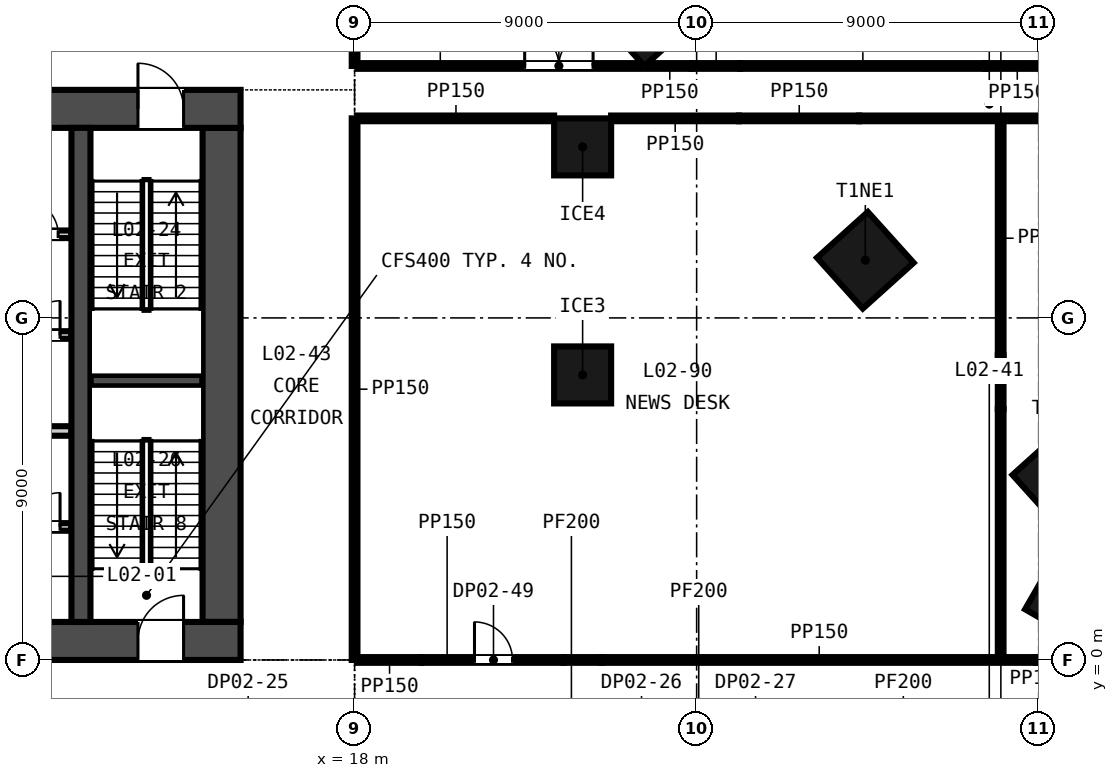
"""IFC4 building model, lengths in metres.
Left out: names, types, materials, properties, quantities, classifications, styles, units other than length and angle.
Written with IfcOpenShell. Run it as: python <this file> out.ifc"""

import sys

from ifc_helpers import new_model, si_unit, direction, frame, frame_2d, origin, origin_2d, place, context, subcontext, project, spatial, rectangle, extrude, element, fill, save


model = new_model("IFC4")
c1 = context("Model", 3, precision=1e-05, world=origin(), true_north=direction((0.0, 1.0)))
c2 = subcontext(c1, "Body", "Model", "MODEL_VIEW")
j1 = project(units=[si_unit("LENGTHUNIT", "METRE"), si_unit("PLANEANGLEUNIT", "RADIAN")], contexts=[c1])
p1 = place(None, origin())
s1 = spatial("IfcSite", under=j1, at=p1, CompositionType="ELEMENT")
p2 = place(p1, origin())
s2 = spatial("IfcBuilding", under=s1, at=p2, CompositionType="ELEMENT")
p3 = place(p2, frame((0.0, 0.0, 18.0)))
s3 = spatial("IfcBuildingStorey", under=s2, at=p3, CompositionType="ELEMENT", Elevation=18.0)
p4 = place(p3, frame((-15.0, 0.5, -0.4), z_axis=(0.0, 0.0, 1.0), x_axis=(1.0, 0.0, 0.0)))
e1 = element("IfcWall", 1, at=p4, inside=s3, PredefinedType="SOLIDWALL", context=c2, shape_type="SweptSolid", body=[
    extrude(rectangle(XDim=30.0, YDim=1.0, at=frame_2d((15.0, 0.0))), origin(), (0.0, 0.0, 1.0), 4.6),
])
p5 = place(p4, frame((5.8, 0.0, 0.4)))
e2 = element("IfcOpeningElement", 2, at=p5, cuts=e1, PredefinedType="OPENING", context=c2, shape_type="SweptSolid", body=[
    extrude(rectangle(XDim=2.4, YDim=2.4, at=frame_2d((1.2, 1.2))), frame((0.0, 0.51, 0.0), z_axis=(0.0, -1.0, 0.0), x_axis=(1.0, 0.0, 0.0)), (0.0, 0.0, 1.0), 1.02),
])
p6 = place(p4, frame((13.8, 0.0, 0.4)))
e3 = element("IfcOpeningElement", 3, at=p6, cuts=e1, PredefinedType="OPENING", context=c2, shape_type="SweptSolid", body=[
    extrude(rectangle(XDim=2.4, YDim=2.4, at=frame_2d((1.2, 1.2))), frame((0.0, 0.51, 0.0), z_axis=(0.0, -1.0, 0.0), x_axis=(1.0, 0.0, 0.0)), (0.0, 0.0, 1.0), 1.02),
])
p7 = place(p4, frame((21.8, 0.0, 0.4)))
e4 = element("IfcOpeningElement", 4, at=p7, cuts=e1, PredefinedType="OPENING", context=c2, shape_type="SweptSolid", body=[
    extrude(rectangle(XDim=2.4, YDim=2.4, at=frame_2d((1.2, 1.2))), frame((0.0, 0.51, 0.0), z_axis=(0.0, -1.0, 0.0), x_axis=(1.0, 0.0, 0.0)), (0.0, 0.0, 1.0), 1.02),
])
p8 = place(p4, frame((1.5, 0.0, 0.4)))
e5 = element("IfcOpeningElement", 5, at=p8, cuts=e1, PredefinedType="OPENING", context=c2, shape_type="SweptSolid", body=[
    extrude(rectangle(XDim=1.2, YDim=2.1, at=frame_2d((0.6, 1.05))), frame((0.0, 0.51, 0.0), z_axis=(0.0, -1.0, 0.0), x_axis=(1.0, 0.0, 0.0)), (0.0, 0.0, 1.0), 1.02),
])
p9 = place(p4, frame((27.3, 0.0, 0.4)))
e6 = element("IfcOpeningElement", 6, at=p9, cuts=e1, PredefinedType="OPENING", context=c2, shape_type="SweptSolid", body=[
    extrude(rectangle(XDim=1.2, YDim=2.1, at=frame_2d((0.6, 1.05))), frame((0.0, 0.51, 0.0), z_axis=(0.0, -1.0, 0.0), x_axis=(1.0, 0.0, 0.0)), (0.0, 0.0, 1.0), 1.02),
])
p10 = place(p3, frame((-15.0, 14.5, -0.4), z_axis=(0.0, 0.0, 1.0), x_axis=(1.0, 0.0, 0.0)))
e7 = element("IfcWall", 7, at=p10, inside=s3, PredefinedType="SOLIDWALL", context=c2, shape_type="SweptSolid", body=[
    extrude(rectangle(XDim=30.0, YDim=1.0, at=frame_2d((15.0, 0.0))), origin(), (0.0, 0.0, 1.0), 4.6),
])
p11 = place(p10, frame((9.25, 0.0, 0.4)))
e8 = element("IfcOpeningElement", 8, at=p11, cuts=e7, PredefinedType="OPENING", context=c2, shape_type="SweptSolid", body=[
    extrude(rectangle(XDim=1.5, YDim=2.1, at=frame_2d((0.75, 1.05))), frame((0.0, 0.51, 0.0), z_axis=(0.0, -1.0, 0.0), x_axis=(1.0, 0.0, 0.0)), (0.0, 0.0, 1.0), 1.02),
])
p12 = place(p10, frame((19.4, 0.0, 0.4)))
e9 = element("IfcOpeningElement", 9, at=p12, cuts=e7, PredefinedType="OPENING", context=c2, shape_type="SweptSolid", body=[
    extrude(rectangle(XDim=1.5, YDim=2.1, at=frame_2d((0.75, 1.05))), frame((0.0, 0.51, 0.0), z_axis=(0.0, -1.0, 0.0), x_axis=(1.0, 0.0, 0.0)), (0.0, 0.0, 1.0), 1.02),
])
p13 = place(p10, frame((1.5, 0.0, 0.4)))
e10 = element("IfcOpeningElement", 10, at=p13, cuts=e7, PredefinedType="OPENING", context=c2, shape_type="SweptSolid", body=[
    extrude(rectangle(XDim=1.2, YDim=2.1, at=frame_2d((0.6, 1.05))), frame((0.0, 0.51, 0.0), z_axis=(0.0, -1.0, 0.0), x_axis=(1.0, 0.0, 0.0)), (0.0, 0.0, 1.0), 1.02),
])
p14 = place(p10, frame((27.3, 0.0, 0.4)))
e11 = element("IfcOpeningElement", 11, at=p14, cuts=e7, PredefinedType="OPENING", context=c2, shape_type="SweptSolid", body=[
    extrude(rectangle(XDim=1.2, YDim=2.1, at=frame_2d((0.6, 1.05))), frame((0.0, 0.51, 0.0), z_axis=(0.0, -1.0, 0.0), x_axis=(1.0, 0.0, 0.0)), (0.0, 0.0, 1.0), 1.02),
])
p15 = place(p3, frame((14.5, 1.0, -0.4), z_axis=(0.0, 0.0, 1.0), x_axis=(0.0, 1.0, 0.0)))
e12 = element("IfcWall", 12, at=p15, inside=s3, PredefinedType="SOLIDWALL", context=c2, shape_type="SweptSolid", body=[
    extrude(rectangle(XDim=13.0, YDim=1.0, at=frame_2d((6.5, 0.0))), origin(), (0.0, 0.0, 1.0), 4.6),
])
p16 = place(p3, frame((10.8, 1.0, -0.4), z_axis=(0.0, 0.0, 1.0), x_axis=(0.0, 1.0, 0.0)))
e13 = element("IfcWall", 13, at=p16, inside=s3, PredefinedType="SOLIDWALL", context=c2, shape_type="SweptSolid", body=[
    extrude(rectangle(XDim=13.0, YDim=0.5, at=frame_2d((6.5, 0.0))), origin(), (0.0, 0.0, 1.0), 4.6),
])
for number, where, z_axis, x_axis in (
    (14, (36.872, 1.663, -0.4), (0.0, 0.0, 1.0), (0.5, 0.866, 0.0)),
    (15, (36.584, 4.803, -0.4), (0.0, 0.0, 1.0), (-0.669, 0.743, 0.0)),
    (16, (31.438, 10.517, -0.4), (0.0, 0.0, 1.0), (-0.669, 0.743, 0.0)),
    (17, (25.691, 16.9, -0.4), (0.0, 0.0, 1.0), (-0.669, 0.743, 0.0)),
):
    element("IfcColumn", number, at=place(p3, frame(where, z_axis=z_axis, x_axis=x_axis)), inside=s3, PredefinedType="COLUMN", context=c2, shape_type="SweptSolid", body=[
        extrude(rectangle(XDim=1.8, YDim=1.8, at=origin_2d()), origin(), (0.0, 0.0, 1.0), 4.6),
    ])
for number, where, z_axis, x_axis in (
    (18, (24.0, 7.5, -0.4), (0.0, 0.0, 1.0), (1.0, 0.0, 0.0)),
    (19, (24.0, 13.5, -0.4), (0.0, 0.0, 1.0), (1.0, 0.0, 0.0)),
):
    element("IfcColumn", number, at=place(p3, frame(where, z_axis=z_axis, x_axis=x_axis)), inside=s3, PredefinedType="COLUMN", context=c2, shape_type="SweptSolid", body=[
        extrude(rectangle(XDim=1.5, YDim=1.5, at=origin_2d()), origin(), (0.0, 0.0, 1.0), 4.6),
    ])
p17 = place(p3, frame((-10.55, 3.5, 0.0), z_axis=(0.0, 0.0, 1.0), x_axis=(1.0, 0.0, 0.0)))
e20 = element("IfcWall", 20, at=p17, inside=s3, PredefinedType="PARTITIONING", context=c2, shape_type="SweptSolid", body=[
    extrude(rectangle(XDim=21.1, YDim=0.2, at=frame_2d((10.55, 0.0))), origin(), (0.0, 0.0, 1.0), 4.2),
])
p18 = place(p17, frame((0.675, 0.0, 0.0)))
e21 = element("IfcOpeningElement", 21, at=p18, cuts=e20, PredefinedType="OPENING", context=c2, shape_type="SweptSolid", body=[
    extrude(rectangle(XDim=1.2, YDim=2.1, at=frame_2d((0.6, 1.05))), frame((0.0, 0.11, 0.0), z_axis=(0.0, -1.0, 0.0), x_axis=(1.0, 0.0, 0.0)), (0.0, 0.0, 1.0), 0.22),
])
p19 = place(p17, frame((3.475, 0.0, 0.0)))
e22 = element("IfcOpeningElement", 22, at=p19, cuts=e20, PredefinedType="OPENING", context=c2, shape_type="SweptSolid", body=[
    extrude(rectangle(XDim=1.2, YDim=2.1, at=frame_2d((0.6, 1.05))), frame((0.0, 0.11, 0.0), z_axis=(0.0, -1.0, 0.0), x_axis=(1.0, 0.0, 0.0)), (0.0, 0.0, 1.0), 0.22),
])
p20 = place(p17, frame((6.275, 0.0, 0.0)))
e23 = element("IfcOpeningElement", 23, at=p20, cuts=e20, PredefinedType="OPENING", context=c2, shape_type="SweptSolid", body=[
    extrude(rectangle(XDim=1.2, YDim=2.1, at=frame_2d((0.6, 1.05))), frame((0.0, 0.11, 0.0), z_axis=(0.0, -1.0, 0.0), x_axis=(1.0, 0.0, 0.0)), (0.0, 0.0, 1.0), 0.22),
])
p21 = place(p17, frame((9.075, 0.0, 0.0)))
e24 = element("IfcOpeningElement", 24, at=p21, cuts=e20, PredefinedType="OPENING", context=c2, shape_type="SweptSolid", body=[
    extrude(rectangle(XDim=1.2, YDim=2.1, at=frame_2d((0.6, 1.05))), frame((0.0, 0.11, 0.0), z_axis=(0.0, -1.0, 0.0), x_axis=(1.0, 0.0, 0.0)), (0.0, 0.0, 1.0), 0.22),
])
p22 = place(p17, frame((11.875, 0.0, 0.0)))
e25 = element("IfcOpeningElement", 25, at=p22, cuts=e20, PredefinedType="OPENING", context=c2, shape_type="SweptSolid", body=[
    extrude(rectangle(XDim=1.2, YDim=2.1, at=frame_2d((0.6, 1.05))), frame((0.0, 0.11, 0.0), z_axis=(0.0, -1.0, 0.0), x_axis=(1.0, 0.0, 0.0)), (0.0, 0.0, 1.0), 0.22),
])
p23 = place(p17, frame((14.675, 0.0, 0.0)))
e26 = element("IfcOpeningElement", 26, at=p23, cuts=e20, PredefinedType="OPENING", context=c2, shape_type="SweptSolid", body=[
    extrude(rectangle(XDim=1.2, YDim=2.1, at=frame_2d((0.6, 1.05))), frame((0.0, 0.11, 0.0), z_axis=(0.0, -1.0, 0.0), x_axis=(1.0, 0.0, 0.0)), (0.0, 0.0, 1.0), 0.22),
])
p24 = place(p17, frame((17.475, 0.0, 0.0)))
e27 = element("IfcOpeningElement", 27, at=p24, cuts=e20, PredefinedType="OPENING", context=c2, shape_type="SweptSolid", body=[
    extrude(rectangle(XDim=1.2, YDim=2.1, at=frame_2d((0.6, 1.05))), frame((0.0, 0.11, 0.0), z_axis=(0.0, -1.0, 0.0), x_axis=(1.0, 0.0, 0.0)), (0.0, 0.0, 1.0), 0.22),
])
p25 = place(p17, frame((19.9, 0.0, 0.0)))
e28 = element("IfcOpeningElement", 28, at=p25, cuts=e20, PredefinedType="OPENING", context=c2, shape_type="SweptSolid", body=[
    extrude(rectangle(XDim=0.9, YDim=2.1, at=frame_2d((0.45, 1.05))), frame((0.0, 0.11, 0.0), z_axis=(0.0, -1.0, 0.0), x_axis=(1.0, 0.0, 0.0)), (0.0, 0.0, 1.0), 0.22),
])
p26 = place(p3, frame((-10.55, 6.025, 0.0), z_axis=(0.0, 0.0, 1.0), x_axis=(1.0, 0.0, 0.0)))
e29 = element("IfcWall", 29, at=p26, inside=s3, PredefinedType="PARTITIONING", context=c2, shape_type="SweptSolid", body=[
    extrude(rectangle(XDim=21.1, YDim=0.25, at=frame_2d((10.55, 0.0))), origin(), (0.0, 0.0, 1.0), 4.2),
])
p27 = place(p3, frame((-4.125, 8.55, 0.0), z_axis=(0.0, 0.0, 1.0), x_axis=(1.0, 0.0, 0.0)))
e30 = element("IfcWall", 30, at=p27, inside=s3, PredefinedType="PARTITIONING", context=c2, shape_type="SweptSolid", body=[
    extrude(rectangle(XDim=14.675, YDim=0.2, at=frame_2d((7.337, 0.0))), origin(), (0.0, 0.0, 1.0), 4.2),
])
p28 = place(p27, frame((1.413, 0.0, 0.0)))
e31 = element("IfcOpeningElement", 31, at=p28, cuts=e30, PredefinedType="OPENING", context=c2, shape_type="SweptSolid", body=[
    extrude(rectangle(XDim=1.0, YDim=2.1, at=frame_2d((0.5, 1.05))), frame((0.0, 0.11, 0.0), z_axis=(0.0, -1.0, 0.0), x_axis=(1.0, 0.0, 0.0)), (0.0, 0.0, 1.0), 0.22),
])
p29 = place(p27, frame((5.0, 0.0, 0.0)))
e32 = element("IfcOpeningElement", 32, at=p29, cuts=e30, PredefinedType="OPENING", context=c2, shape_type="SweptSolid", body=[
    extrude(rectangle(XDim=1.0, YDim=2.1, at=frame_2d((0.5, 1.05))), frame((0.0, 0.11, 0.0), z_axis=(0.0, -1.0, 0.0), x_axis=(1.0, 0.0, 0.0)), (0.0, 0.0, 1.0), 0.22),
])
p30 = place(p27, frame((9.613, 0.0, 0.0)))
e33 = element("IfcOpeningElement", 33, at=p30, cuts=e30, PredefinedType="OPENING", context=c2, shape_type="SweptSolid", body=[
    extrude(rectangle(XDim=1.0, YDim=2.1, at=frame_2d((0.5, 1.05))), frame((0.0, 0.11, 0.0), z_axis=(0.0, -1.0, 0.0), x_axis=(1.0, 0.0, 0.0)), (0.0, 0.0, 1.0), 0.22),
])
p31 = place(p27, frame((13.475, 0.0, 0.0)))
e34 = element("IfcOpeningElement", 34, at=p31, cuts=e30, PredefinedType="OPENING", context=c2, shape_type="SweptSolid", body=[
    extrude(rectangle(XDim=0.9, YDim=2.1, at=frame_2d((0.45, 1.05))), frame((0.0, 0.11, 0.0), z_axis=(0.0, -1.0, 0.0), x_axis=(1.0, 0.0, 0.0)), (0.0, 0.0, 1.0), 0.22),
])
p32 = place(p3, frame((5.9, 11.2, 0.0), z_axis=(0.0, 0.0, 1.0), x_axis=(1.0, 0.0, 0.0)))
e35 = element("IfcWall", 35, at=p32, inside=s3, PredefinedType="PARTITIONING", context=c2, shape_type="SweptSolid", body=[
    extrude(rectangle(XDim=4.65, YDim=0.2, at=frame_2d((2.325, 0.0))), origin(), (0.0, 0.0, 1.0), 4.2),
])
p33 = place(p32, frame((3.4, 0.0, 0.0)))
e36 = element("IfcOpeningElement", 36, at=p33, cuts=e35, PredefinedType="OPENING", context=c2, shape_type="SweptSolid", body=[
    extrude(rectangle(XDim=0.9, YDim=2.1, at=frame_2d((0.45, 1.05))), frame((0.0, 0.11, 0.0), z_axis=(0.0, -1.0, 0.0), x_axis=(1.0, 0.0, 0.0)), (0.0, 0.0, 1.0), 0.22),
])
p34 = place(p3, frame((11.05, 7.35, -0.4), z_axis=(0.0, 0.0, 1.0), x_axis=(1.0, 0.0, 0.0)))
e37 = element("IfcWall", 37, at=p34, inside=s3, PredefinedType="SOLIDWALL", context=c2, shape_type="SweptSolid", body=[
    extrude(rectangle(XDim=2.95, YDim=0.3, at=frame_2d((1.475, 0.0))), origin(), (0.0, 0.0, 1.0), 4.6),
])
p35 = place(p3, frame((18.075, 0.0, 0.0), z_axis=(0.0, 0.0, 1.0), x_axis=(1.0, 0.0, 0.0)))
e38 = element("IfcWall", 38, at=p35, inside=s3, PredefinedType="PARTITIONING", context=c2, shape_type="SweptSolid", body=[
    extrude(rectangle(XDim=1.68, YDim=0.15, at=frame_2d((0.84, 0.0))), origin(), (0.0, 0.0, 1.0), 3.597),
])
p36 = place(p3, frame((19.755, 0.0, 0.0), z_axis=(0.0, 0.0, 1.0), x_axis=(1.0, 0.0, 0.0)))
e39 = element("IfcWall", 39, at=p36, inside=s3, PredefinedType="PARTITIONING", context=c2, shape_type="SweptSolid", body=[
    extrude(rectangle(XDim=3.745, YDim=0.15, at=frame_2d((1.873, 0.0))), origin(), (0.0, 0.0, 1.0), 4.2),
])
p37 = place(p36, frame((1.4, 0.0, 0.0)))
e40 = element("IfcOpeningElement", 40, at=p37, cuts=e39, PredefinedType="OPENING", context=c2, shape_type="SweptSolid", body=[
    extrude(rectangle(XDim=1.0, YDim=2.1, at=frame_2d((0.5, 1.05))), frame((0.0, 0.085, 0.0), z_axis=(0.0, -1.0, 0.0), x_axis=(1.0, 0.0, 0.0)), (0.0, 0.0, 1.0), 0.17),
])
p38 = place(p3, frame((23.5, 0.0, 0.0), z_axis=(0.0, 0.0, 1.0), x_axis=(1.0, 0.0, 0.0)))
e41 = element("IfcWall", 41, at=p38, inside=s3, PredefinedType="PARTITIONING", context=c2, shape_type="SweptSolid", body=[
    extrude(rectangle(XDim=1.0, YDim=0.15, at=frame_2d((0.5, 0.0))), origin(), (0.0, 0.0, 1.0), 3.111),
])
p39 = place(p3, frame((24.5, 0.0, 0.0), z_axis=(0.0, 0.0, 1.0), x_axis=(1.0, 0.0, 0.0)))
e42 = element("IfcWall", 42, at=p39, inside=s3, PredefinedType="PARTITIONING", context=c2, shape_type="SweptSolid", body=[
    extrude(rectangle(XDim=11.44, YDim=0.15, at=frame_2d((5.72, 0.0))), origin(), (0.0, 0.0, 1.0), 4.2),
])
p40 = place(p3, frame((35.94, 0.0, 0.0), z_axis=(0.0, 0.0, 1.0), x_axis=(1.0, 0.0, 0.0)))
e43 = element("IfcWall", 43, at=p40, inside=s3, PredefinedType="PARTITIONING", context=c2, shape_type="SweptSolid", body=[
    extrude(rectangle(XDim=1.097, YDim=0.15, at=frame_2d((0.548, 0.0))), origin(), (0.0, 0.0, 1.0), 3.2),
])
p41 = place(p3, frame((18.075, 14.25, 0.0), z_axis=(0.0, 0.0, 1.0), x_axis=(1.0, 0.0, 0.0)))
e44 = element("IfcWall", 44, at=p41, inside=s3, PredefinedType="PARTITIONING", context=c2, shape_type="SweptSolid", body=[
    extrude(rectangle(XDim=5.175, YDim=0.15, at=frame_2d((2.587, 0.0))), origin(), (0.0, 0.0, 1.0), 4.2),
])
p42 = place(p3, frame((24.75, 14.25, 0.0), z_axis=(0.0, 0.0, 1.0), x_axis=(1.0, 0.0, 0.0)))
e45 = element("IfcWall", 45, at=p42, inside=s3, PredefinedType="PARTITIONING", context=c2, shape_type="SweptSolid", body=[
    extrude(rectangle(XDim=3.361, YDim=0.15, at=frame_2d((1.681, 0.0))), origin(), (0.0, 0.0, 1.0), 4.2),
])
p43 = place(p3, frame((28.111, 14.25, 0.0), z_axis=(0.0, 0.0, 1.0), x_axis=(1.0, 0.0, 0.0)))
e46 = element("IfcWall", 46, at=p43, inside=s3, PredefinedType="PARTITIONING", context=c2, shape_type="SweptSolid", body=[
    extrude(rectangle(XDim=3.167, YDim=0.15, at=frame_2d((1.583, 0.0))), origin(), (0.0, 0.0, 1.0), 3.2),
])
p44 = place(p3, frame((31.278, 14.25, 0.0), z_axis=(0.0, 0.0, 1.0), x_axis=(1.0, 0.0, 0.0)))
e47 = element("IfcWall", 47, at=p44, inside=s3, PredefinedType="PARTITIONING", context=c2, shape_type="SweptSolid", body=[
    extrude(rectangle(XDim=20.122, YDim=0.15, at=frame_2d((10.061, 0.0))), origin(), (0.0, 0.0, 1.0), 4.2),
])
p45 = place(p3, frame((18.075, 15.629, 0.0), z_axis=(0.0, 0.0, 1.0), x_axis=(1.0, 0.0, 0.0)))
e48 = element("IfcWall", 48, at=p45, inside=s3, PredefinedType="PARTITIONING", context=c2, shape_type="SweptSolid", body=[
    extrude(rectangle(XDim=7.482, YDim=0.15, at=frame_2d((3.741, 0.0))), origin(), (0.0, 0.0, 1.0), 4.2),
])
p46 = place(p45, frame((4.4, 0.0, 0.0)))
e49 = element("IfcOpeningElement", 49, at=p46, cuts=e48, PredefinedType="OPENING", context=c2, shape_type="SweptSolid", body=[
    extrude(rectangle(XDim=1.8, YDim=2.4, at=frame_2d((0.9, 1.2))), frame((0.0, 0.085, 0.0), z_axis=(0.0, -1.0, 0.0), x_axis=(1.0, 0.0, 0.0)), (0.0, 0.0, 1.0), 0.17),
])
p47 = place(p3, frame((25.708, 15.629, 0.0), z_axis=(0.0, 0.0, 1.0), x_axis=(1.0, 0.0, 0.0)))
e50 = element("IfcWall", 50, at=p47, inside=s3, PredefinedType="PARTITIONING", context=c2, shape_type="SweptSolid", body=[
    extrude(rectangle(XDim=1.162, YDim=0.15, at=frame_2d((0.581, 0.0))), origin(), (0.0, 0.0, 1.0), 4.2),
])
p48 = place(p3, frame((26.869, 15.629, 0.0), z_axis=(0.0, 0.0, 1.0), x_axis=(1.0, 0.0, 0.0)))
e51 = element("IfcWall", 51, at=p48, inside=s3, PredefinedType="PARTITIONING", context=c2, shape_type="SweptSolid", body=[
    extrude(rectangle(XDim=1.278, YDim=0.15, at=frame_2d((0.639, 0.0))), origin(), (0.0, 0.0, 1.0), 3.2),
])
p49 = place(p3, frame((28.148, 15.629, 0.0), z_axis=(0.0, 0.0, 1.0), x_axis=(1.0, 0.0, 0.0)))
e52 = element("IfcWall", 52, at=p49, inside=s3, PredefinedType="PARTITIONING", context=c2, shape_type="SweptSolid", body=[
    extrude(rectangle(XDim=6.441, YDim=0.15, at=frame_2d((3.221, 0.0))), origin(), (0.0, 0.0, 1.0), 4.2),
])
p50 = place(p3, frame((34.589, 15.629, 0.0), z_axis=(0.0, 0.0, 1.0), x_axis=(1.0, 0.0, 0.0)))
e53 = element("IfcWall", 53, at=p50, inside=s3, PredefinedType="PARTITIONING", context=c2, shape_type="SweptSolid", body=[
    extrude(rectangle(XDim=1.685, YDim=0.15, at=frame_2d((0.843, 0.0))), origin(), (0.0, 0.0, 1.0), 3.219),
])
p51 = place(p3, frame((18.0, 0.0, 0.0), z_axis=(0.0, 0.0, 1.0), x_axis=(0.0, 1.0, 0.0)))
e54 = element("IfcWall", 54, at=p51, inside=s3, PredefinedType="PARTITIONING", context=c2, shape_type="SweptSolid", body=[
    extrude(rectangle(XDim=14.25, YDim=0.15, at=frame_2d((7.125, 0.0))), origin(), (0.0, 0.0, 1.0), 4.2),
])
p52 = place(p3, frame((18.0, 15.629, 0.0), z_axis=(0.0, 0.0, 1.0), x_axis=(0.0, 1.0, 0.0)))
e55 = element("IfcWall", 55, at=p52, inside=s3, PredefinedType="PARTITIONING", context=c2, shape_type="SweptSolid", body=[
    extrude(rectangle(XDim=9.85, YDim=0.15, at=frame_2d((4.925, 0.0))), origin(), (0.0, 0.0, 1.0), 4.2),
])
p53 = place(p3, frame((35.0, 0.075, 0.0), z_axis=(0.0, 0.0, 1.0), x_axis=(0.0, 1.0, 0.0)))
e56 = element("IfcWall", 56, at=p53, inside=s3, PredefinedType="PARTITIONING", context=c2, shape_type="SweptSolid", body=[
    extrude(rectangle(XDim=6.524, YDim=0.15, at=frame_2d((3.262, 0.0))), origin(), (0.0, 0.0, 1.0), 4.2),
])
p54 = place(p3, frame((35.0, 6.599, 0.0), z_axis=(0.0, 0.0, 1.0), x_axis=(0.0, 1.0, 0.0)))
e57 = element("IfcWall", 57, at=p54, inside=s3, PredefinedType="PARTITIONING", context=c2, shape_type="SweptSolid", body=[
    extrude(rectangle(XDim=1.42, YDim=0.15, at=frame_2d((0.71, 0.0))), origin(), (0.0, 0.0, 1.0), 3.2),
])
p55 = place(p3, frame((35.0, 8.019, 0.0), z_axis=(0.0, 0.0, 1.0), x_axis=(0.0, 1.0, 0.0)))
e58 = element("IfcWall", 58, at=p55, inside=s3, PredefinedType="PARTITIONING", context=c2, shape_type="SweptSolid", body=[
    extrude(rectangle(XDim=6.156, YDim=0.15, at=frame_2d((3.078, 0.0))), origin(), (0.0, 0.0, 1.0), 4.2),
])
p56 = place(p25, origin())
e59 = element("IfcDoor", 59, at=p56, inside=s3, OperationType="SINGLE_SWING_RIGHT", PredefinedType="DOOR", context=c2, shape_type="SweptSolid", body=[
    extrude(rectangle(XDim=0.9, YDim=2.1, at=frame_2d((0.45, 1.05))), frame((0.0, 0.025, 0.0), z_axis=(0.0, -1.0, 0.0), x_axis=(1.0, 0.0, 0.0)), (0.0, 0.0, 1.0), 0.05),
])
fill(e28, e59)
p57 = place(p31, origin())
e60 = element("IfcDoor", 60, at=p57, inside=s3, OperationType="SINGLE_SWING_RIGHT", PredefinedType="DOOR", context=c2, shape_type="SweptSolid", body=[
    extrude(rectangle(XDim=0.9, YDim=2.1, at=frame_2d((0.45, 1.05))), frame((0.0, 0.025, 0.0), z_axis=(0.0, -1.0, 0.0), x_axis=(1.0, 0.0, 0.0)), (0.0, 0.0, 1.0), 0.05),
])
fill(e34, e60)
p58 = place(p33, origin())
e61 = element("IfcDoor", 61, at=p58, inside=s3, OperationType="SINGLE_SWING_LEFT", PredefinedType="DOOR", context=c2, shape_type="SweptSolid", body=[
    extrude(rectangle(XDim=0.9, YDim=2.1, at=frame_2d((0.45, 1.05))), frame((0.0, 0.025, 0.0), z_axis=(0.0, -1.0, 0.0), x_axis=(1.0, 0.0, 0.0)), (0.0, 0.0, 1.0), 0.05),
])
fill(e36, e61)
p59 = place(p14, origin())
e62 = element("IfcDoor", 62, at=p59, inside=s3, OperationType="SINGLE_SWING_LEFT", PredefinedType="DOOR", context=c2, shape_type="SweptSolid", body=[
    extrude(rectangle(XDim=1.2, YDim=2.1, at=frame_2d((0.6, 1.05))), frame((0.0, 0.025, 0.0), z_axis=(0.0, -1.0, 0.0), x_axis=(1.0, 0.0, 0.0)), (0.0, 0.0, 1.0), 0.05),
])
fill(e11, e62)
p60 = place(p9, origin())
e63 = element("IfcDoor", 63, at=p60, inside=s3, OperationType="SINGLE_SWING_RIGHT", PredefinedType="DOOR", context=c2, shape_type="SweptSolid", body=[
    extrude(rectangle(XDim=1.2, YDim=2.1, at=frame_2d((0.6, 1.05))), frame((0.0, 0.025, 0.0), z_axis=(0.0, -1.0, 0.0), x_axis=(1.0, 0.0, 0.0)), (0.0, 0.0, 1.0), 0.05),
])
fill(e6, e63)
p61 = place(p46, origin())
e64 = element("IfcDoor", 64, at=p61, inside=s3, OperationType="SINGLE_SWING_LEFT", PredefinedType="DOOR", context=c2, shape_type="SweptSolid", body=[
    extrude(rectangle(XDim=1.8, YDim=2.4, at=frame_2d((0.9, 1.2))), frame((0.0, 0.025, 0.0), z_axis=(0.0, -1.0, 0.0), x_axis=(1.0, 0.0, 0.0)), (0.0, 0.0, 1.0), 0.05),
])
fill(e49, e64)
p62 = place(p37, origin())
e65 = element("IfcDoor", 65, at=p62, inside=s3, OperationType="SINGLE_SWING_LEFT", PredefinedType="DOOR", context=c2, shape_type="SweptSolid", body=[
    extrude(rectangle(XDim=1.0, YDim=2.1, at=frame_2d((0.5, 1.05))), frame((0.0, 0.025, 0.0), z_axis=(0.0, -1.0, 0.0), x_axis=(1.0, 0.0, 0.0)), (0.0, 0.0, 1.0), 0.05),
])
fill(e40, e65)
save(model, sys.argv[1])
